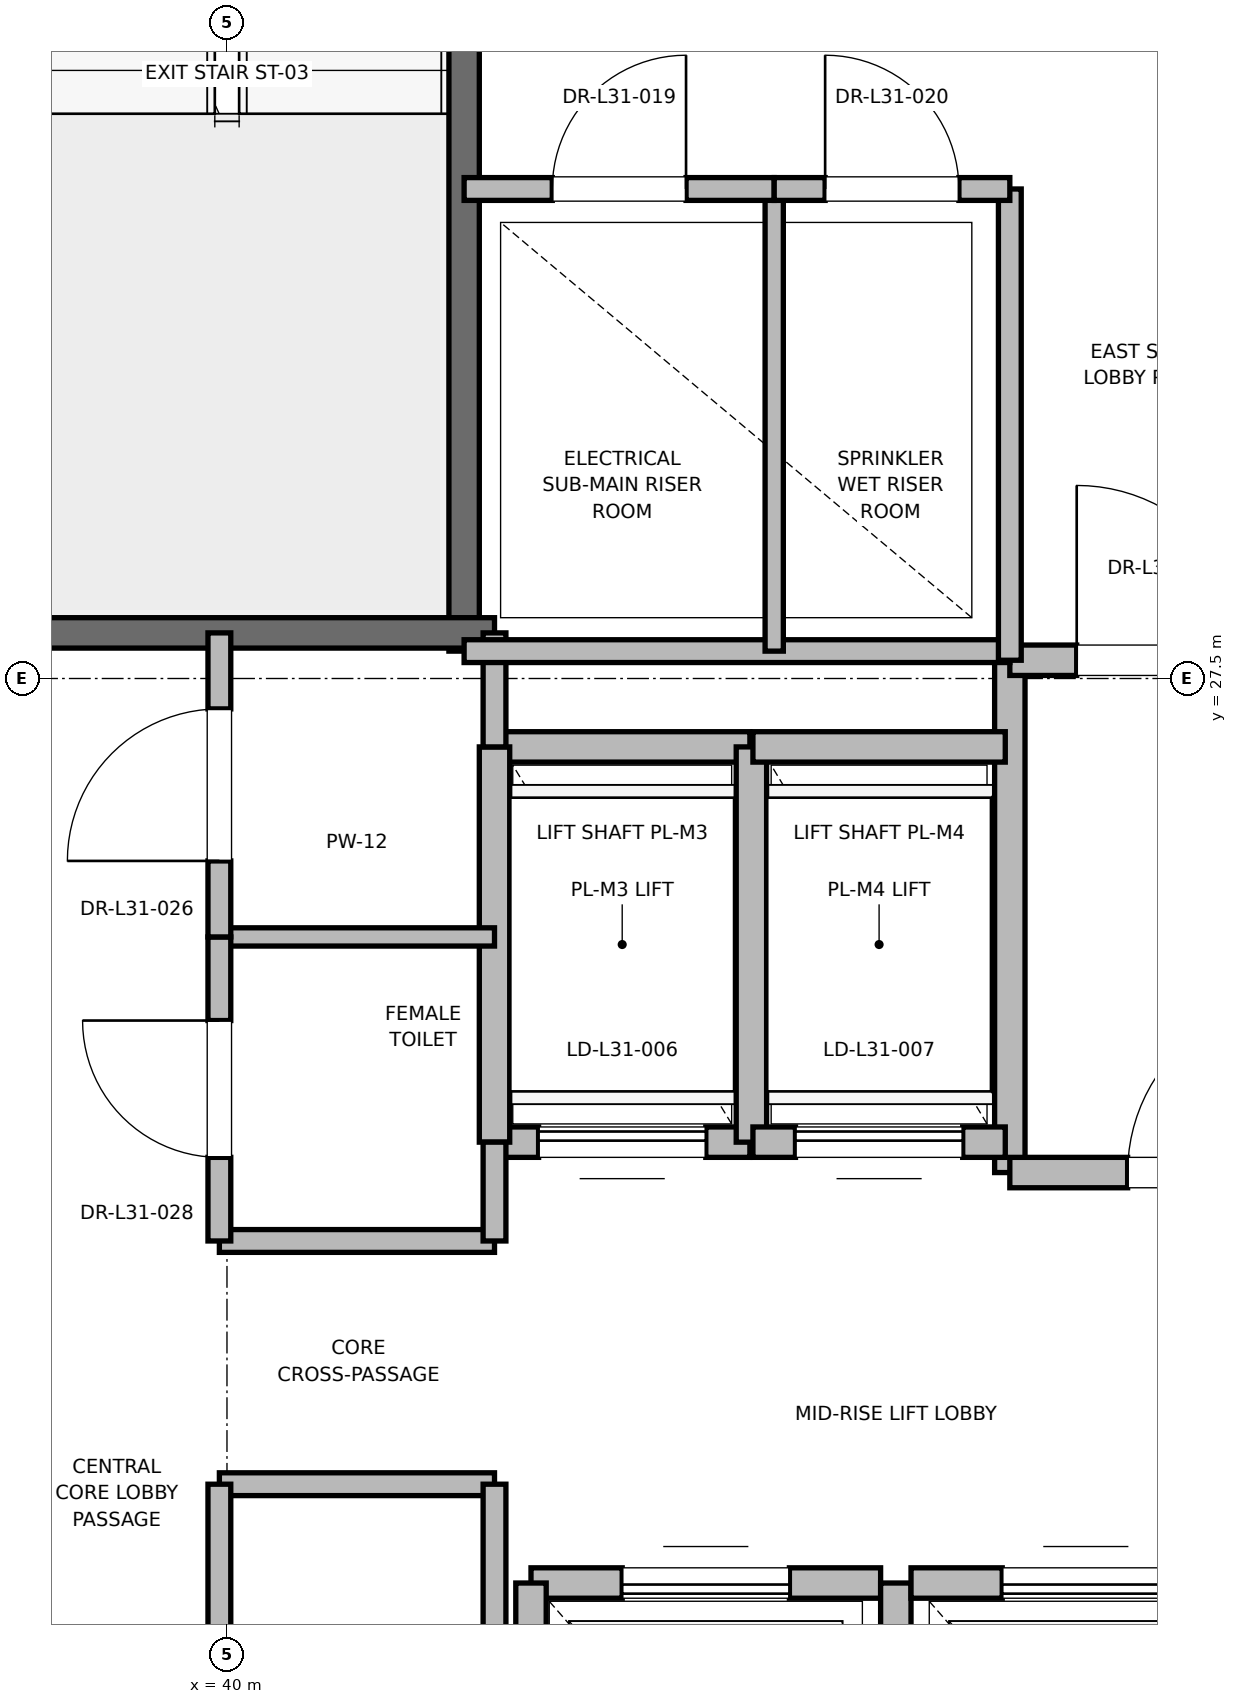
"""IFC4 building model, lengths in metres.
Left out: names, types, materials, properties, quantities, classifications, styles, units other than length and angle.
Written with IfcOpenShell. Run it as: python <this file> out.ifc"""

import sys

from ifc_helpers import new_model, si_unit, direction, frame, frame_2d, origin, place, context, subcontext, project, spatial, rectangle, extrude, element, fill, save


model = new_model("IFC4")
c1 = context("Model", 3, precision=1e-05, world=origin(), true_north=direction((0.0, 1.0)))
c2 = subcontext(c1, "Body", "Model", "MODEL_VIEW")
j1 = project(units=[si_unit("LENGTHUNIT", "METRE"), si_unit("PLANEANGLEUNIT", "RADIAN")], contexts=[c1])
p1 = place(None, origin())
s1 = spatial("IfcSite", under=j1, at=p1, CompositionType="ELEMENT")
p2 = place(p1, origin())
s2 = spatial("IfcBuilding", under=s1, at=p2, CompositionType="ELEMENT")
p3 = place(p2, frame((0.0, 0.0, 136.4)))
s3 = spatial("IfcBuildingStorey", under=s2, at=p3, CompositionType="ELEMENT", Elevation=136.4)
p4 = place(p3, frame((41.56, 27.68, 0.0), z_axis=(0.0, 0.0, 1.0), x_axis=(0.0, 1.0, 0.0)))
e1 = element("IfcWall", 1, at=p4, inside=s3, PredefinedType="SOLIDWALL", context=c2, shape_type="SweptSolid", body=[
    extrude(rectangle(XDim=8.57, YDim=0.2, at=frame_2d((4.285, 0.0))), origin(), (0.0, 0.0, 1.0), 3.775),
])
p5 = place(p3, frame((38.44, 27.8, 0.0), z_axis=(0.0, 0.0, 1.0), x_axis=(1.0, 0.0, 0.0)))
e2 = element("IfcWall", 2, at=p5, inside=s3, PredefinedType="SOLIDWALL", context=c2, shape_type="SweptSolid", body=[
    extrude(rectangle(XDim=3.32, YDim=0.2, at=frame_2d((1.66, 0.0))), origin(), (0.0, 0.0, 1.0), 3.775),
])
p6 = place(p3, frame((45.15, 24.25, 0.0), z_axis=(0.0, 0.0, 1.0), x_axis=(0.0, 1.0, 0.0)))
e3 = element("IfcWall", 3, at=p6, inside=s3, PredefinedType="PARTITIONING", context=c2, shape_type="SweptSolid", body=[
    extrude(rectangle(XDim=3.37, YDim=0.2, at=frame_2d((1.685, 0.0))), origin(), (0.0, 0.0, 1.0), 3.775),
])
p7 = place(p3, frame((45.15, 24.25, 0.0), z_axis=(0.0, 0.0, 1.0), x_axis=(1.0, 0.0, 0.0)))
e4 = element("IfcWall", 4, at=p7, inside=s3, PredefinedType="PARTITIONING", context=c2, shape_type="SweptSolid", body=[
    extrude(rectangle(XDim=2.7, YDim=0.2, at=frame_2d((1.35, 0.0))), origin(), (0.0, 0.0, 1.0), 3.775),
])
p8 = place(p7, frame((0.775, 0.0, 0.0)))
e5 = element("IfcOpeningElement", 5, at=p8, cuts=e4, PredefinedType="OPENING", context=c2, shape_type="SweptSolid", body=[
    extrude(rectangle(XDim=1.15, YDim=2.2, at=frame_2d((0.575, 1.1))), frame((0.0, 0.1, 0.0), z_axis=(0.0, -1.0, 0.0), x_axis=(1.0, 0.0, 0.0)), (0.0, 0.0, 1.0), 0.2),
])
p9 = place(p3, frame((45.15, 27.62, 0.0), z_axis=(0.0, 0.0, 1.0), x_axis=(1.0, 0.0, 0.0)))
e6 = element("IfcWall", 6, at=p9, inside=s3, PredefinedType="PARTITIONING", context=c2, shape_type="SweptSolid", body=[
    extrude(rectangle(XDim=2.03, YDim=0.2, at=frame_2d((1.015, 0.0))), origin(), (0.0, 0.0, 1.0), 3.775),
])
p10 = place(p9, frame((0.44, 0.0, 0.0)))
e7 = element("IfcOpeningElement", 7, at=p10, cuts=e6, PredefinedType="OPENING", context=c2, shape_type="SweptSolid", body=[
    extrude(rectangle(XDim=1.15, YDim=2.2, at=frame_2d((0.575, 1.1))), frame((0.0, 0.1, 0.0), z_axis=(0.0, -1.0, 0.0), x_axis=(1.0, 0.0, 0.0)), (0.0, 0.0, 1.0), 0.2),
])
p11 = place(p3, frame((44.3, 21.55, 0.0), z_axis=(0.0, 0.0, 1.0), x_axis=(-1.0, 0.0, 0.0)))
e8 = element("IfcWall", 8, at=p11, inside=s3, PredefinedType="SOLIDWALL", context=c2, shape_type="SweptSolid", body=[
    extrude(rectangle(XDim=2.3, YDim=0.2, at=frame_2d((1.15, 0.0))), origin(), (0.0, 0.0, 1.0), 3.775),
])
p12 = place(p11, frame((0.6, 0.0, 0.0)))
e9 = element("IfcOpeningElement", 9, at=p12, cuts=e8, PredefinedType="OPENING", context=c2, shape_type="SweptSolid", body=[
    extrude(rectangle(XDim=1.1, YDim=2.2, at=frame_2d((0.55, 1.1))), frame((0.0, 0.1, 0.0), z_axis=(0.0, -1.0, 0.0), x_axis=(1.0, 0.0, 0.0)), (0.0, 0.0, 1.0), 0.2),
])
p13 = place(p3, frame((42.0, 21.55, 0.0), z_axis=(0.0, 0.0, 1.0), x_axis=(0.0, -1.0, 0.0)))
e10 = element("IfcWall", 10, at=p13, inside=s3, PredefinedType="SOLIDWALL", context=c2, shape_type="SweptSolid", body=[
    extrude(rectangle(XDim=2.6, YDim=0.2, at=frame_2d((1.3, 0.0))), origin(), (0.0, 0.0, 1.0), 2.755),
])
p14 = place(p3, frame((44.4, 18.95, 0.0), z_axis=(0.0, 0.0, 1.0), x_axis=(0.0, 1.0, 0.0)))
e11 = element("IfcWall", 11, at=p14, inside=s3, PredefinedType="SOLIDWALL", context=c2, shape_type="SweptSolid", body=[
    extrude(rectangle(XDim=2.6, YDim=0.2, at=frame_2d((1.3, 0.0))), origin(), (0.0, 0.0, 1.0), 3.775),
])
p15 = place(p3, frame((46.8, 21.55, 0.0), z_axis=(0.0, 0.0, 1.0), x_axis=(-1.0, 0.0, 0.0)))
e12 = element("IfcWall", 12, at=p15, inside=s3, PredefinedType="SOLIDWALL", context=c2, shape_type="SweptSolid", body=[
    extrude(rectangle(XDim=2.3, YDim=0.2, at=frame_2d((1.15, 0.0))), origin(), (0.0, 0.0, 1.0), 3.775),
])
p16 = place(p15, frame((0.6, 0.0, 0.0)))
e13 = element("IfcOpeningElement", 13, at=p16, cuts=e12, PredefinedType="OPENING", context=c2, shape_type="SweptSolid", body=[
    extrude(rectangle(XDim=1.1, YDim=2.2, at=frame_2d((0.55, 1.1))), frame((0.0, 0.1, 0.0), z_axis=(0.0, -1.0, 0.0), x_axis=(1.0, 0.0, 0.0)), (0.0, 0.0, 1.0), 0.2),
])
p17 = place(p3, frame((41.76, 24.45, 0.0), z_axis=(0.0, 0.0, 1.0), x_axis=(1.0, 0.0, 0.0)))
e14 = element("IfcWall", 14, at=p17, inside=s3, PredefinedType="SOLIDWALL", context=c2, shape_type="SweptSolid", body=[
    extrude(rectangle(XDim=1.68, YDim=0.2, at=frame_2d((0.84, 0.0))), origin(), (0.0, 0.0, 1.0), 3.775),
])
p18 = place(p17, frame((0.29, 0.0, 0.0)))
e15 = element("IfcOpeningElement", 15, at=p18, cuts=e14, PredefinedType="OPENING", context=c2, shape_type="SweptSolid", body=[
    extrude(rectangle(XDim=1.1, YDim=2.2, at=frame_2d((0.55, 1.1))), frame((0.0, 0.1, 0.0), z_axis=(0.0, -1.0, 0.0), x_axis=(1.0, 0.0, 0.0)), (0.0, 0.0, 1.0), 0.2),
])
p19 = place(p3, frame((43.44, 27.05, 0.0), z_axis=(0.0, 0.0, 1.0), x_axis=(-1.0, 0.0, 0.0)))
e16 = element("IfcWall", 16, at=p19, inside=s3, PredefinedType="SOLIDWALL", context=c2, shape_type="SweptSolid", body=[
    extrude(rectangle(XDim=1.68, YDim=0.2, at=frame_2d((0.84, 0.0))), origin(), (0.0, 0.0, 1.0), 3.775),
])
for number, where, z_axis, x_axis in (
    (17, (41.76, 27.05, 0.0), (0.0, 0.0, 1.0), (0.0, -1.0, 0.0)),
    (18, (43.45, 24.45, 0.0), (0.0, 0.0, 1.0), (0.0, 1.0, 0.0)),
):
    element("IfcWall", number, at=place(p3, frame(where, z_axis=z_axis, x_axis=x_axis)), inside=s3, PredefinedType="SOLIDWALL", context=c2, shape_type="SweptSolid", body=[
        extrude(rectangle(XDim=2.6, YDim=0.2, at=frame_2d((1.3, 0.0))), origin(), (0.0, 0.0, 1.0), 3.775),
    ])
p20 = place(p3, frame((43.46, 24.45, 0.0), z_axis=(0.0, 0.0, 1.0), x_axis=(1.0, 0.0, 0.0)))
e19 = element("IfcWall", 19, at=p20, inside=s3, PredefinedType="SOLIDWALL", context=c2, shape_type="SweptSolid", body=[
    extrude(rectangle(XDim=1.66, YDim=0.2, at=frame_2d((0.83, 0.0))), origin(), (0.0, 0.0, 1.0), 3.775),
])
p21 = place(p20, frame((0.28, 0.0, 0.0)))
e20 = element("IfcOpeningElement", 20, at=p21, cuts=e19, PredefinedType="OPENING", context=c2, shape_type="SweptSolid", body=[
    extrude(rectangle(XDim=1.1, YDim=2.2, at=frame_2d((0.55, 1.1))), frame((0.0, 0.1, 0.0), z_axis=(0.0, -1.0, 0.0), x_axis=(1.0, 0.0, 0.0)), (0.0, 0.0, 1.0), 0.2),
])
p22 = place(p3, frame((45.12, 27.05, 0.0), z_axis=(0.0, 0.0, 1.0), x_axis=(-1.0, 0.0, 0.0)))
e21 = element("IfcWall", 21, at=p22, inside=s3, PredefinedType="SOLIDWALL", context=c2, shape_type="SweptSolid", body=[
    extrude(rectangle(XDim=1.66, YDim=0.2, at=frame_2d((0.83, 0.0))), origin(), (0.0, 0.0, 1.0), 3.775),
])
for number, where, z_axis, x_axis in (
    (22, (39.95, 22.2, 0.0), (0.0, 0.0, 1.0), (1.0, 0.0, 0.0)),
    (23, (39.95, 23.8, 0.0), (0.0, 0.0, 1.0), (1.0, 0.0, 0.0)),
):
    element("IfcWall", number, at=place(p3, frame(where, z_axis=z_axis, x_axis=x_axis)), inside=s3, PredefinedType="PARTITIONING", context=c2, shape_type="SweptSolid", body=[
        extrude(rectangle(XDim=1.81, YDim=0.15, at=frame_2d((0.905, 0.0))), origin(), (0.0, 0.0, 1.0), 2.85),
    ])
p23 = place(p3, frame((39.95, 25.8, 0.0), z_axis=(0.0, 0.0, 1.0), x_axis=(1.0, 0.0, 0.0)))
e24 = element("IfcWall", 24, at=p23, inside=s3, PredefinedType="PARTITIONING", context=c2, shape_type="SweptSolid", body=[
    extrude(rectangle(XDim=1.81, YDim=0.12, at=frame_2d((0.905, 0.0))), origin(), (0.0, 0.0, 1.0), 2.85),
])
p24 = place(p3, frame((41.76, 18.6, 0.0), z_axis=(0.0, 0.0, 1.0), x_axis=(0.0, 1.0, 0.0)))
e25 = element("IfcWall", 25, at=p24, inside=s3, PredefinedType="PARTITIONING", context=c2, shape_type="SweptSolid", body=[
    extrude(rectangle(XDim=3.6, YDim=0.15, at=frame_2d((1.8, 0.0))), origin(), (0.0, 0.0, 1.0), 2.755),
])
p25 = place(p3, frame((41.76, 23.8, 0.0), z_axis=(0.0, 0.0, 1.0), x_axis=(0.0, 1.0, 0.0)))
e26 = element("IfcWall", 26, at=p25, inside=s3, PredefinedType="PARTITIONING", context=c2, shape_type="SweptSolid", body=[
    extrude(rectangle(XDim=0.65, YDim=0.15, at=frame_2d((0.325, 0.0))), origin(), (0.0, 0.0, 1.0), 2.85),
])
p26 = place(p3, frame((41.76, 27.05, 0.0), z_axis=(0.0, 0.0, 1.0), x_axis=(0.0, 1.0, 0.0)))
e27 = element("IfcWall", 27, at=p26, inside=s3, PredefinedType="PARTITIONING", context=c2, shape_type="SweptSolid", body=[
    extrude(rectangle(XDim=0.75, YDim=0.15, at=frame_2d((0.375, 0.0))), origin(), (0.0, 0.0, 1.0), 2.85),
])
p27 = place(p3, frame((39.95, 19.2, 0.0), z_axis=(0.0, 0.0, 1.0), x_axis=(0.0, 1.0, 0.0)))
e28 = element("IfcWall", 28, at=p27, inside=s3, PredefinedType="PARTITIONING", context=c2, shape_type="SweptSolid", body=[
    extrude(rectangle(XDim=3.0, YDim=0.15, at=frame_2d((1.5, 0.0))), origin(), (0.0, 0.0, 1.0), 2.85),
])
p28 = place(p27, frame((1.05, 0.0, 0.0)))
e29 = element("IfcOpeningElement", 29, at=p28, cuts=e28, PredefinedType="OPENING", context=c2, shape_type="SweptSolid", body=[
    extrude(rectangle(XDim=0.9, YDim=2.1, at=frame_2d((0.45, 1.05))), frame((0.0, 0.075, 0.0), z_axis=(0.0, -1.0, 0.0), x_axis=(1.0, 0.0, 0.0)), (0.0, 0.0, 1.0), 0.15),
])
p29 = place(p3, frame((39.95, 23.8, 0.0), z_axis=(0.0, 0.0, 1.0), x_axis=(0.0, 1.0, 0.0)))
e30 = element("IfcWall", 30, at=p29, inside=s3, PredefinedType="PARTITIONING", context=c2, shape_type="SweptSolid", body=[
    extrude(rectangle(XDim=2.0, YDim=0.15, at=frame_2d((1.0, 0.0))), origin(), (0.0, 0.0, 1.0), 2.85),
])
p30 = place(p29, frame((0.55, 0.0, 0.0)))
e31 = element("IfcOpeningElement", 31, at=p30, cuts=e30, PredefinedType="OPENING", context=c2, shape_type="SweptSolid", body=[
    extrude(rectangle(XDim=0.9, YDim=2.1, at=frame_2d((0.45, 1.05))), frame((0.0, 0.075, 0.0), z_axis=(0.0, -1.0, 0.0), x_axis=(1.0, 0.0, 0.0)), (0.0, 0.0, 1.0), 0.15),
])
p31 = place(p3, frame((39.95, 25.8, 0.0), z_axis=(0.0, 0.0, 1.0), x_axis=(0.0, 1.0, 0.0)))
e32 = element("IfcWall", 32, at=p31, inside=s3, PredefinedType="PARTITIONING", context=c2, shape_type="SweptSolid", body=[
    extrude(rectangle(XDim=2.0, YDim=0.15, at=frame_2d((1.0, 0.0))), origin(), (0.0, 0.0, 1.0), 2.85),
])
p32 = place(p31, frame((0.5, 0.0, 0.0)))
e33 = element("IfcOpeningElement", 33, at=p32, cuts=e32, PredefinedType="OPENING", context=c2, shape_type="SweptSolid", body=[
    extrude(rectangle(XDim=1.0, YDim=2.15, at=frame_2d((0.5, 1.075))), frame((0.0, 0.075, 0.0), z_axis=(0.0, -1.0, 0.0), x_axis=(1.0, 0.0, 0.0)), (0.0, 0.0, 1.0), 0.15),
])
p33 = place(p3, frame((41.56, 27.68, 0.0), z_axis=(0.0, 0.0, 1.0), x_axis=(1.0, 0.0, 0.0)))
e34 = element("IfcWall", 34, at=p33, inside=s3, PredefinedType="PARTITIONING", context=c2, shape_type="SweptSolid", body=[
    extrude(rectangle(XDim=3.59, YDim=0.15, at=frame_2d((1.795, 0.0))), origin(), (0.0, 0.0, 1.0), 2.85),
])
p34 = place(p3, frame((45.15, 27.62, 0.0), z_axis=(0.0, 0.0, 1.0), x_axis=(0.0, 1.0, 0.0)))
e35 = element("IfcWall", 35, at=p34, inside=s3, PredefinedType="PARTITIONING", context=c2, shape_type="SweptSolid", body=[
    extrude(rectangle(XDim=3.1, YDim=0.15, at=frame_2d((1.55, 0.0))), origin(), (0.0, 0.0, 1.0), 2.85),
])
p35 = place(p3, frame((43.6, 27.68, 0.0), z_axis=(0.0, 0.0, 1.0), x_axis=(0.0, 1.0, 0.0)))
e36 = element("IfcWall", 36, at=p35, inside=s3, PredefinedType="PARTITIONING", context=c2, shape_type="SweptSolid", body=[
    extrude(rectangle(XDim=3.04, YDim=0.12, at=frame_2d((1.52, 0.0))), origin(), (0.0, 0.0, 1.0), 2.85),
])
p36 = place(p3, frame((41.56, 30.72, 0.0), z_axis=(0.0, 0.0, 1.0), x_axis=(1.0, 0.0, 0.0)))
e37 = element("IfcWall", 37, at=p36, inside=s3, PredefinedType="PARTITIONING", context=c2, shape_type="SweptSolid", body=[
    extrude(rectangle(XDim=2.04, YDim=0.15, at=frame_2d((1.02, 0.0))), origin(), (0.0, 0.0, 1.0), 2.85),
])
p37 = place(p36, frame((0.58, 0.0, 0.0)))
e38 = element("IfcOpeningElement", 38, at=p37, cuts=e37, PredefinedType="OPENING", context=c2, shape_type="SweptSolid", body=[
    extrude(rectangle(XDim=0.88, YDim=2.1, at=frame_2d((0.44, 1.05))), frame((0.0, 0.075, 0.0), z_axis=(0.0, -1.0, 0.0), x_axis=(1.0, 0.0, 0.0)), (0.0, 0.0, 1.0), 0.15),
])
p38 = place(p3, frame((43.6, 30.72, 0.0), z_axis=(0.0, 0.0, 1.0), x_axis=(1.0, 0.0, 0.0)))
e39 = element("IfcWall", 39, at=p38, inside=s3, PredefinedType="PARTITIONING", context=c2, shape_type="SweptSolid", body=[
    extrude(rectangle(XDim=1.55, YDim=0.15, at=frame_2d((0.775, 0.0))), origin(), (0.0, 0.0, 1.0), 2.85),
])
p39 = place(p38, frame((0.335, 0.0, 0.0)))
e40 = element("IfcOpeningElement", 40, at=p39, cuts=e39, PredefinedType="OPENING", context=c2, shape_type="SweptSolid", body=[
    extrude(rectangle(XDim=0.88, YDim=2.1, at=frame_2d((0.44, 1.05))), frame((0.0, 0.075, 0.0), z_axis=(0.0, -1.0, 0.0), x_axis=(1.0, 0.0, 0.0)), (0.0, 0.0, 1.0), 0.15),
])
p40 = place(p8, origin())
e41 = element("IfcDoor", 41, at=p40, inside=s3, OperationType="SINGLE_SWING_RIGHT", PredefinedType="DOOR", context=c2, shape_type="SweptSolid", body=[
    extrude(rectangle(XDim=1.15, YDim=2.2, at=frame_2d((0.575, 1.1))), frame((0.0, 0.025, 0.0), z_axis=(0.0, -1.0, 0.0), x_axis=(1.0, 0.0, 0.0)), (0.0, 0.0, 1.0), 0.05),
])
fill(e5, e41)
p41 = place(p10, origin())
e42 = element("IfcDoor", 42, at=p41, inside=s3, OperationType="SINGLE_SWING_LEFT", PredefinedType="DOOR", context=c2, shape_type="SweptSolid", body=[
    extrude(rectangle(XDim=1.15, YDim=2.2, at=frame_2d((0.575, 1.1))), frame((0.0, 0.025, 0.0), z_axis=(0.0, -1.0, 0.0), x_axis=(1.0, 0.0, 0.0)), (0.0, 0.0, 1.0), 0.05),
])
fill(e7, e42)
p42 = place(p12, origin())
e43 = element("IfcDoor", 43, at=p42, inside=s3, OperationType="SLIDING_TO_RIGHT", PredefinedType="DOOR", context=c2, shape_type="SweptSolid", body=[
    extrude(rectangle(XDim=1.1, YDim=2.2, at=frame_2d((0.55, 1.1))), frame((0.0, 0.025, 0.0), z_axis=(0.0, -1.0, 0.0), x_axis=(1.0, 0.0, 0.0)), (0.0, 0.0, 1.0), 0.05),
])
fill(e9, e43)
p43 = place(p16, origin())
e44 = element("IfcDoor", 44, at=p43, inside=s3, OperationType="SLIDING_TO_RIGHT", PredefinedType="DOOR", context=c2, shape_type="SweptSolid", body=[
    extrude(rectangle(XDim=1.1, YDim=2.2, at=frame_2d((0.55, 1.1))), frame((0.0, 0.025, 0.0), z_axis=(0.0, -1.0, 0.0), x_axis=(1.0, 0.0, 0.0)), (0.0, 0.0, 1.0), 0.05),
])
fill(e13, e44)
p44 = place(p18, origin())
e45 = element("IfcDoor", 45, at=p44, inside=s3, OperationType="SLIDING_TO_RIGHT", PredefinedType="DOOR", context=c2, shape_type="SweptSolid", body=[
    extrude(rectangle(XDim=1.1, YDim=2.2, at=frame_2d((0.55, 1.1))), frame((0.0, 0.025, 0.0), z_axis=(0.0, -1.0, 0.0), x_axis=(1.0, 0.0, 0.0)), (0.0, 0.0, 1.0), 0.05),
])
fill(e15, e45)
p45 = place(p21, origin())
e46 = element("IfcDoor", 46, at=p45, inside=s3, OperationType="SLIDING_TO_RIGHT", PredefinedType="DOOR", context=c2, shape_type="SweptSolid", body=[
    extrude(rectangle(XDim=1.1, YDim=2.2, at=frame_2d((0.55, 1.1))), frame((0.0, 0.025, 0.0), z_axis=(0.0, -1.0, 0.0), x_axis=(1.0, 0.0, 0.0)), (0.0, 0.0, 1.0), 0.05),
])
fill(e20, e46)
p46 = place(p30, origin())
e47 = element("IfcDoor", 47, at=p46, inside=s3, OperationType="SINGLE_SWING_RIGHT", PredefinedType="DOOR", context=c2, shape_type="SweptSolid", body=[
    extrude(rectangle(XDim=0.9, YDim=2.1, at=frame_2d((0.45, 1.05))), frame((0.0, 0.025, 0.0), z_axis=(0.0, -1.0, 0.0), x_axis=(1.0, 0.0, 0.0)), (0.0, 0.0, 1.0), 0.05),
])
fill(e31, e47)
p47 = place(p32, origin())
e48 = element("IfcDoor", 48, at=p47, inside=s3, OperationType="SINGLE_SWING_LEFT", PredefinedType="DOOR", context=c2, shape_type="SweptSolid", body=[
    extrude(rectangle(XDim=1.0, YDim=2.15, at=frame_2d((0.5, 1.075))), frame((0.0, 0.025, 0.0), z_axis=(0.0, -1.0, 0.0), x_axis=(1.0, 0.0, 0.0)), (0.0, 0.0, 1.0), 0.05),
])
fill(e33, e48)
p48 = place(p37, origin())
e49 = element("IfcDoor", 49, at=p48, inside=s3, OperationType="SINGLE_SWING_RIGHT", PredefinedType="DOOR", context=c2, shape_type="SweptSolid", body=[
    extrude(rectangle(XDim=0.88, YDim=2.1, at=frame_2d((0.44, 1.05))), frame((0.0, 0.025, 0.0), z_axis=(0.0, -1.0, 0.0), x_axis=(1.0, 0.0, 0.0)), (0.0, 0.0, 1.0), 0.05),
])
fill(e38, e49)
p49 = place(p39, origin())
e50 = element("IfcDoor", 50, at=p49, inside=s3, OperationType="SINGLE_SWING_LEFT", PredefinedType="DOOR", context=c2, shape_type="SweptSolid", body=[
    extrude(rectangle(XDim=0.88, YDim=2.1, at=frame_2d((0.44, 1.05))), frame((0.0, 0.025, 0.0), z_axis=(0.0, -1.0, 0.0), x_axis=(1.0, 0.0, 0.0)), (0.0, 0.0, 1.0), 0.05),
])
fill(e40, e50)
save(model, sys.argv[1])
